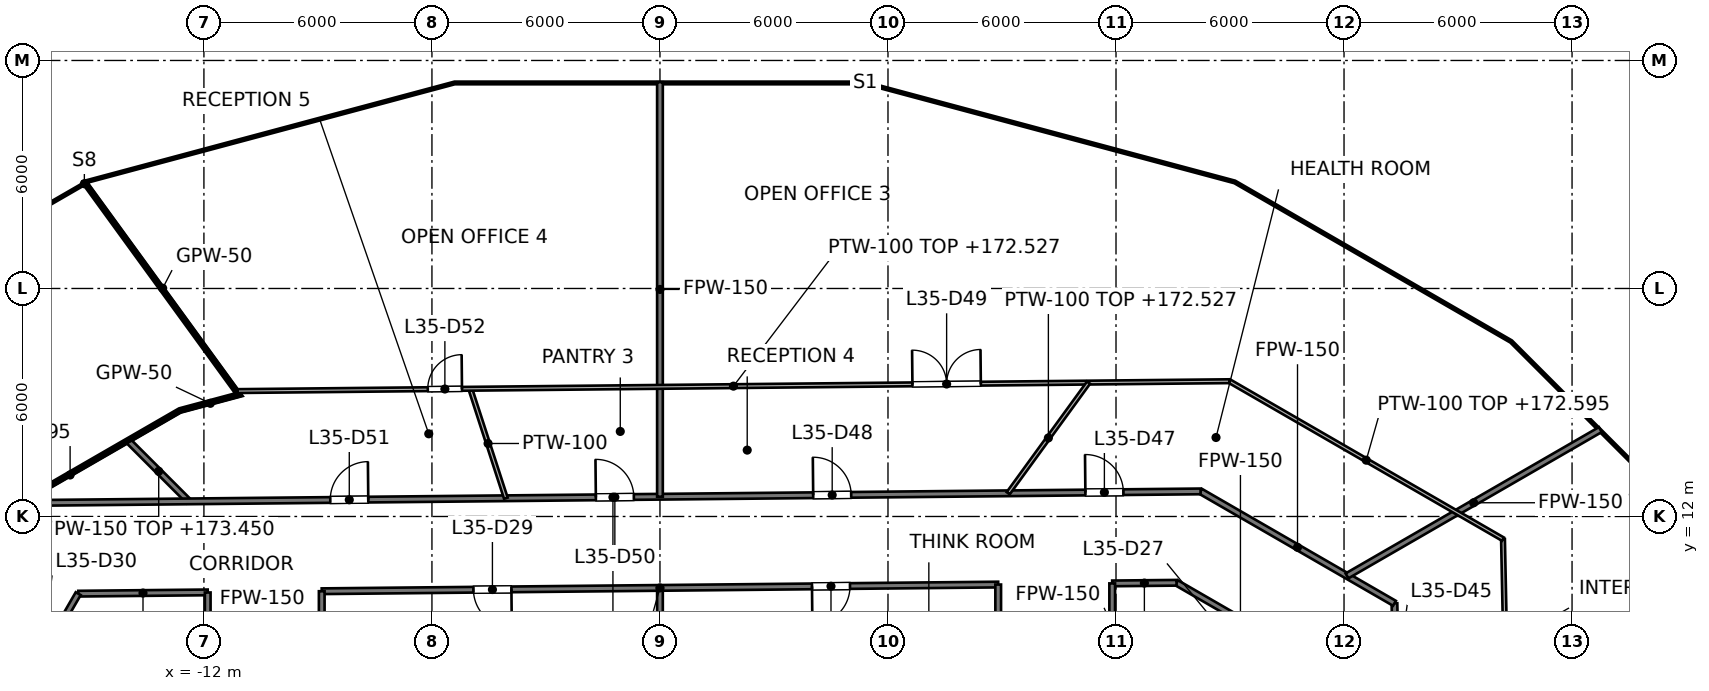
"""IFC4 building model, lengths in metres.
Left out: names, types, materials, properties, quantities, classifications, styles, units other than length and angle.
Written with IfcOpenShell. Run it as: python <this file> out.ifc"""

import sys

from ifc_helpers import new_model, si_unit, direction, frame, frame_2d, origin, place, context, subcontext, project, spatial, rectangle, extrude, element, fill, save


model = new_model("IFC4")
c1 = context("Model", 3, precision=1e-05, world=origin(), true_north=direction((0.0, 1.0)))
c2 = subcontext(c1, "Body", "Model", "MODEL_VIEW")
j1 = project(units=[si_unit("LENGTHUNIT", "METRE"), si_unit("PLANEANGLEUNIT", "RADIAN")], contexts=[c1])
p1 = place(None, origin())
s1 = spatial("IfcSite", under=j1, at=p1, CompositionType="ELEMENT")
p2 = place(p1, origin())
s2 = spatial("IfcBuilding", under=s1, at=p2, CompositionType="ELEMENT")
p3 = place(p2, frame((0.0, 0.0, 169.6)))
s3 = spatial("IfcBuildingStorey", under=s2, at=p3, CompositionType="ELEMENT", Elevation=169.6)
p4 = place(p3, frame((19.327, 9.716, 0.0), z_axis=(0.0, 0.0, 1.0), x_axis=(0.020632909715, -0.999787118859, 0.0)))
e1 = element("IfcWall", 1, at=p4, inside=s3, PredefinedType="PARTITIONING", context=c2, shape_type="SweptSolid", body=[
    extrude(rectangle(XDim=16.921, YDim=0.15, at=frame_2d((8.46, 0.0))), origin(), (0.0, 0.0, 1.0), 2.927),
])
p5 = place(p4, frame((15.451, 0.0, 0.0)))
e2 = element("IfcOpeningElement", 2, at=p5, cuts=e1, PredefinedType="OPENING", context=c2, shape_type="SweptSolid", body=[
    extrude(rectangle(XDim=1.0, YDim=2.1, at=frame_2d((0.5, 1.05))), frame((0.0, 0.075, 0.0), z_axis=(0.0, -1.0, 0.0), x_axis=(1.0, 0.0, 0.0)), (0.0, 0.0, 1.0), 0.15),
])
p6 = place(p4, frame((12.819, 0.0, 0.0)))
e3 = element("IfcOpeningElement", 3, at=p6, cuts=e1, PredefinedType="OPENING", context=c2, shape_type="SweptSolid", body=[
    extrude(rectangle(XDim=1.0, YDim=2.1, at=frame_2d((0.5, 1.05))), frame((0.0, 0.075, 0.0), z_axis=(0.0, -1.0, 0.0), x_axis=(1.0, 0.0, 0.0)), (0.0, 0.0, 1.0), 0.15),
])
p7 = place(p4, frame((9.226, 0.0, 0.0)))
e4 = element("IfcOpeningElement", 4, at=p7, cuts=e1, PredefinedType="OPENING", context=c2, shape_type="SweptSolid", body=[
    extrude(rectangle(XDim=1.0, YDim=2.1, at=frame_2d((0.5, 1.05))), frame((0.0, 0.075, 0.0), z_axis=(0.0, -1.0, 0.0), x_axis=(1.0, 0.0, 0.0)), (0.0, 0.0, 1.0), 0.15),
])
p8 = place(p4, frame((5.762, 0.0, 0.0)))
e5 = element("IfcOpeningElement", 5, at=p8, cuts=e1, PredefinedType="OPENING", context=c2, shape_type="SweptSolid", body=[
    extrude(rectangle(XDim=1.0, YDim=2.1, at=frame_2d((0.5, 1.05))), frame((0.0, 0.075, 0.0), z_axis=(0.0, -1.0, 0.0), x_axis=(1.0, 0.0, 0.0)), (0.0, 0.0, 1.0), 0.15),
])
p9 = place(p4, frame((1.706, 0.0, 0.0)))
e6 = element("IfcOpeningElement", 6, at=p9, cuts=e1, PredefinedType="OPENING", context=c2, shape_type="SweptSolid", body=[
    extrude(rectangle(XDim=1.0, YDim=2.1, at=frame_2d((0.5, 1.05))), frame((0.0, 0.075, 0.0), z_axis=(0.0, -1.0, 0.0), x_axis=(1.0, 0.0, 0.0)), (0.0, 0.0, 1.0), 0.15),
])
p10 = place(p3, frame((-13.981, 13.981, 0.0), z_axis=(0.0, 0.0, 1.0), x_axis=(0.707106781187, -0.707106781187, 0.0)))
e7 = element("IfcWall", 7, at=p10, inside=s3, PredefinedType="PARTITIONING", context=c2, shape_type="SweptSolid", body=[
    extrude(rectangle(XDim=2.239, YDim=0.15, at=frame_2d((1.119, 0.0))), origin(), (0.0, 0.0, 1.0), 3.85),
])
p11 = place(p3, frame((13.593, 10.256, 0.0), z_axis=(0.0, 0.0, 1.0), x_axis=(0.86597823907, -0.500081682786, 0.0)))
e8 = element("IfcWall", 8, at=p11, inside=s3, PredefinedType="PARTITIONING", context=c2, shape_type="SweptSolid", body=[
    extrude(rectangle(XDim=3.883, YDim=0.15, at=frame_2d((1.941, 0.0))), origin(), (0.0, 0.0, 1.0), 2.995),
])
p12 = place(p3, frame((14.225, 12.662, 0.0), z_axis=(0.0, 0.0, 1.0), x_axis=(0.865969566972, -0.500096699728, 0.0)))
e9 = element("IfcWall", 9, at=p12, inside=s3, PredefinedType="PARTITIONING", context=c2, shape_type="SweptSolid", body=[
    extrude(rectangle(XDim=5.891, YDim=0.15, at=frame_2d((2.946, 0.0))), origin(), (0.0, 0.0, 1.0), 2.995),
])
p13 = place(p3, frame((-15.306, 9.969, 0.0), z_axis=(0.0, 0.0, 1.0), x_axis=(0.999951080092, 0.009891280127, 0.0)))
e10 = element("IfcWall", 10, at=p13, inside=s3, PredefinedType="PARTITIONING", context=c2, shape_type="SweptSolid", body=[
    extrude(rectangle(XDim=3.406, YDim=0.15, at=frame_2d((1.703, 0.0))), origin(), (0.0, 0.0, 1.0), 2.995),
])
p14 = place(p3, frame((-8.9, 10.033, 0.0), z_axis=(0.0, 0.0, 1.0), x_axis=(0.999951376553, 0.009861264055, 0.0)))
e11 = element("IfcWall", 11, at=p14, inside=s3, PredefinedType="PARTITIONING", context=c2, shape_type="SweptSolid", body=[
    extrude(rectangle(XDim=17.801, YDim=0.15, at=frame_2d((8.9, 0.0))), origin(), (0.0, 0.0, 1.0), 2.927),
])
p15 = place(p14, frame((12.901, 0.0, 0.0)))
e12 = element("IfcOpeningElement", 12, at=p15, cuts=e11, PredefinedType="OPENING", context=c2, shape_type="SweptSolid", body=[
    extrude(rectangle(XDim=1.0, YDim=2.1, at=frame_2d((0.5, 1.05))), frame((0.0, 0.075, 0.0), z_axis=(0.0, -1.0, 0.0), x_axis=(1.0, 0.0, 0.0)), (0.0, 0.0, 1.0), 0.15),
])
p16 = place(p14, frame((3.992, 0.0, 0.0)))
e13 = element("IfcOpeningElement", 13, at=p16, cuts=e11, PredefinedType="OPENING", context=c2, shape_type="SweptSolid", body=[
    extrude(rectangle(XDim=1.0, YDim=2.1, at=frame_2d((0.5, 1.05))), frame((0.0, 0.075, 0.0), z_axis=(0.0, -1.0, 0.0), x_axis=(1.0, 0.0, 0.0)), (0.0, 0.0, 1.0), 0.15),
])
p17 = place(p3, frame((11.9, 10.239, 0.0), z_axis=(0.0, 0.0, 1.0), x_axis=(0.999951931166, 0.009804863925, 0.0)))
e14 = element("IfcWall", 14, at=p17, inside=s3, PredefinedType="PARTITIONING", context=c2, shape_type="SweptSolid", body=[
    extrude(rectangle(XDim=1.693, YDim=0.15, at=frame_2d((0.847, 0.0))), origin(), (0.0, 0.0, 1.0), 3.85),
])
p18 = place(p3, frame((-16.7, 12.355, 0.0), z_axis=(0.0, 0.0, 1.0), x_axis=(0.999951312483, 0.009867758809, 0.0)))
e15 = element("IfcWall", 15, at=p18, inside=s3, PredefinedType="PARTITIONING", context=c2, shape_type="SweptSolid", body=[
    extrude(rectangle(XDim=30.927, YDim=0.15, at=frame_2d((15.463, 0.0))), origin(), (0.0, 0.0, 1.0), 2.927),
])
p19 = place(p18, frame((27.896, 0.0, 0.0)))
e16 = element("IfcOpeningElement", 16, at=p19, cuts=e15, PredefinedType="OPENING", context=c2, shape_type="SweptSolid", body=[
    extrude(rectangle(XDim=1.0, YDim=2.1, at=frame_2d((0.5, 1.05))), frame((0.0, 0.075, 0.0), z_axis=(0.0, -1.0, 0.0), x_axis=(1.0, 0.0, 0.0)), (0.0, 0.0, 1.0), 0.15),
])
p20 = place(p18, frame((20.733, 0.0, 0.0)))
e17 = element("IfcOpeningElement", 17, at=p20, cuts=e15, PredefinedType="OPENING", context=c2, shape_type="SweptSolid", body=[
    extrude(rectangle(XDim=1.0, YDim=2.1, at=frame_2d((0.5, 1.05))), frame((0.0, 0.075, 0.0), z_axis=(0.0, -1.0, 0.0), x_axis=(1.0, 0.0, 0.0)), (0.0, 0.0, 1.0), 0.15),
])
p21 = place(p18, frame((15.014, 0.0, 0.0)))
e18 = element("IfcOpeningElement", 18, at=p21, cuts=e15, PredefinedType="OPENING", context=c2, shape_type="SweptSolid", body=[
    extrude(rectangle(XDim=1.0, YDim=2.1, at=frame_2d((0.5, 1.05))), frame((0.0, 0.075, 0.0), z_axis=(0.0, -1.0, 0.0), x_axis=(1.0, 0.0, 0.0)), (0.0, 0.0, 1.0), 0.15),
])
p22 = place(p18, frame((8.025, 0.0, 0.0)))
e19 = element("IfcOpeningElement", 19, at=p22, cuts=e15, PredefinedType="OPENING", context=c2, shape_type="SweptSolid", body=[
    extrude(rectangle(XDim=1.0, YDim=2.1, at=frame_2d((0.5, 1.05))), frame((0.0, 0.075, 0.0), z_axis=(0.0, -1.0, 0.0), x_axis=(1.0, 0.0, 0.0)), (0.0, 0.0, 1.0), 0.15),
])
p23 = place(p3, frame((18.078, 10.437, 0.0), z_axis=(0.0, 0.0, 1.0), x_axis=(0.865997546841, 0.500048246539, 0.0)))
e20 = element("IfcWall", 20, at=p23, inside=s3, PredefinedType="PARTITIONING", context=c2, shape_type="SweptSolid", body=[
    extrude(rectangle(XDim=7.698, YDim=0.15, at=frame_2d((3.849, 0.0))), origin(), (0.0, 0.0, 1.0), 3.152),
])
p24 = place(p3, frame((-17.25, 6.603, 0.0), z_axis=(0.0, 0.0, 1.0), x_axis=(0.499659014053, 0.866222182627, 0.0)))
e21 = element("IfcWall", 21, at=p24, inside=s3, PredefinedType="PARTITIONING", context=c2, shape_type="SweptSolid", body=[
    extrude(rectangle(XDim=3.887, YDim=0.15, at=frame_2d((1.943, 0.0))), origin(), (0.0, 0.0, 1.0), 2.995),
])
p25 = place(p24, frame((1.434, 0.0, 0.0)))
e22 = element("IfcOpeningElement", 22, at=p25, cuts=e21, PredefinedType="OPENING", context=c2, shape_type="SweptSolid", body=[
    extrude(rectangle(XDim=1.0, YDim=2.1, at=frame_2d((0.5, 1.05))), frame((0.0, 0.075, 0.0), z_axis=(0.0, -1.0, 0.0), x_axis=(1.0, 0.0, 0.0)), (0.0, 0.0, 1.0), 0.15),
])
p26 = place(p3, frame((11.9, 8.0, 0.0), z_axis=(0.0, 0.0, 1.0), x_axis=(0.0, 1.0, 0.0)))
e23 = element("IfcWall", 23, at=p26, inside=s3, PredefinedType="PARTITIONING", context=c2, shape_type="SweptSolid", body=[
    extrude(rectangle(XDim=2.239, YDim=0.15, at=frame_2d((1.12, 0.0))), origin(), (0.0, 0.0, 1.0), 2.995),
])
p27 = place(p3, frame((8.9, 8.0, 0.0), z_axis=(0.0, 0.0, 1.0), x_axis=(0.0, 1.0, 0.0)))
e24 = element("IfcWall", 24, at=p27, inside=s3, PredefinedType="PARTITIONING", context=c2, shape_type="SweptSolid", body=[
    extrude(rectangle(XDim=2.209, YDim=0.15, at=frame_2d((1.104, 0.0))), origin(), (0.0, 0.0, 1.0), 3.076),
])
p28 = place(p3, frame((0.0, 8.0, 0.0), z_axis=(0.0, 0.0, 1.0), x_axis=(0.0, 1.0, 0.0)))
e25 = element("IfcWall", 25, at=p28, inside=s3, PredefinedType="PARTITIONING", context=c2, shape_type="SweptSolid", body=[
    extrude(rectangle(XDim=2.121, YDim=0.15, at=frame_2d((1.061, 0.0))), origin(), (0.0, 0.0, 1.0), 2.995),
])
p29 = place(p3, frame((0.0, 12.521, 0.0), z_axis=(0.0, 0.0, 1.0), x_axis=(0.0, 1.0, 0.0)))
e26 = element("IfcWall", 26, at=p29, inside=s3, PredefinedType="PARTITIONING", context=c2, shape_type="SweptSolid", body=[
    extrude(rectangle(XDim=10.908, YDim=0.15, at=frame_2d((5.454, 0.0))), origin(), (0.0, 0.0, 1.0), 2.995),
])
p30 = place(p3, frame((-8.9, 8.0, 0.0), z_axis=(0.0, 0.0, 1.0), x_axis=(0.0, 1.0, 0.0)))
e27 = element("IfcWall", 27, at=p30, inside=s3, PredefinedType="PARTITIONING", context=c2, shape_type="SweptSolid", body=[
    extrude(rectangle(XDim=2.033, YDim=0.15, at=frame_2d((1.017, 0.0))), origin(), (0.0, 0.0, 1.0), 3.85),
])
p31 = place(p3, frame((-11.9, 8.0, 0.0), z_axis=(0.0, 0.0, 1.0), x_axis=(0.0, 1.0, 0.0)))
e28 = element("IfcWall", 28, at=p31, inside=s3, PredefinedType="PARTITIONING", context=c2, shape_type="SweptSolid", body=[
    extrude(rectangle(XDim=2.0, YDim=0.15, at=frame_2d((1.0, 0.0))), origin(), (0.0, 0.0, 1.0), 2.995),
])
p32 = place(p3, frame((-15.132, 20.822, 0.0), z_axis=(0.0, 0.0, 1.0), x_axis=(0.588027821511, -0.808840701949, 0.0)))
e29 = element("IfcWall", 29, at=p32, inside=s3, PredefinedType="PARTITIONING", context=c2, shape_type="SweptSolid", body=[
    extrude(rectangle(XDim=6.962, YDim=0.05, at=frame_2d((3.481, 0.0))), origin(), (0.0, 0.0, 1.0), 2.927),
])
p33 = place(p3, frame((-12.623, 14.765, 0.0), z_axis=(0.0, 0.0, 1.0), x_axis=(0.965831022922, 0.259172597242, 0.0)))
e30 = element("IfcWall", 30, at=p33, inside=s3, PredefinedType="PARTITIONING", context=c2, shape_type="SweptSolid", body=[
    extrude(rectangle(XDim=1.64, YDim=0.05, at=frame_2d((0.82, 0.0))), origin(), (0.0, 0.0, 1.0), 2.927),
])
p34 = place(p3, frame((-18.419, 11.419, 0.0), z_axis=(0.0, 0.0, 1.0), x_axis=(0.866045865693, 0.499964557259, 0.0)))
e31 = element("IfcWall", 31, at=p34, inside=s3, PredefinedType="PARTITIONING", context=c2, shape_type="SweptSolid", body=[
    extrude(rectangle(XDim=6.692, YDim=0.05, at=frame_2d((3.346, 0.0))), origin(), (0.0, 0.0, 1.0), 2.995),
])
p35 = place(p3, frame((22.183, 11.404, 0.0), z_axis=(0.0, 0.0, 1.0), x_axis=(0.020584540725, -0.999788115894, 0.0)))
e32 = element("IfcWall", 32, at=p35, inside=s3, PredefinedType="PARTITIONING", context=c2, shape_type="SweptSolid", body=[
    extrude(rectangle(XDim=19.356, YDim=0.1, at=frame_2d((9.678, 0.0))), origin(), (0.0, 0.0, 1.0), 2.927),
])
p36 = place(p35, frame((2.704, 0.0, 0.0)))
e33 = element("IfcOpeningElement", 33, at=p36, cuts=e32, PredefinedType="OPENING", context=c2, shape_type="SweptSolid", body=[
    extrude(rectangle(XDim=1.8, YDim=2.1, at=frame_2d((0.9, 1.05))), frame((0.0, 0.05, 0.0), z_axis=(0.0, -1.0, 0.0), x_axis=(1.0, 0.0, 0.0)), (0.0, 0.0, 1.0), 0.1),
])
p37 = place(p3, frame((-4.991, 15.361, 0.0), z_axis=(0.0, 0.0, 1.0), x_axis=(0.309084249462, -0.951034661164, 0.0)))
e34 = element("IfcWall", 34, at=p37, inside=s3, PredefinedType="PARTITIONING", context=c2, shape_type="SweptSolid", body=[
    extrude(rectangle(XDim=3.028, YDim=0.1, at=frame_2d((1.514, 0.0))), origin(), (0.0, 0.0, 1.0), 3.85),
])
p38 = place(p3, frame((14.986, 15.56, 0.0), z_axis=(0.0, 0.0, 1.0), x_axis=(0.865930670747, -0.500164046549, 0.0)))
e35 = element("IfcWall", 35, at=p38, inside=s3, PredefinedType="PARTITIONING", context=c2, shape_type="SweptSolid", body=[
    extrude(rectangle(XDim=8.311, YDim=0.1, at=frame_2d((4.155, 0.0))), origin(), (0.0, 0.0, 1.0), 2.995),
])
p39 = place(p3, frame((-11.119, 15.3, 0.0), z_axis=(0.0, 0.0, 1.0), x_axis=(0.999950401303, 0.009959665352, 0.0)))
e36 = element("IfcWall", 36, at=p39, inside=s3, PredefinedType="PARTITIONING", context=c2, shape_type="SweptSolid", body=[
    extrude(rectangle(XDim=26.106, YDim=0.1, at=frame_2d((13.053, 0.0))), origin(), (0.0, 0.0, 1.0), 2.927),
])
p40 = place(p39, frame((17.763, 0.0, 0.0)))
e37 = element("IfcOpeningElement", 37, at=p40, cuts=e36, PredefinedType="OPENING", context=c2, shape_type="SweptSolid", body=[
    extrude(rectangle(XDim=1.8, YDim=2.1, at=frame_2d((0.9, 1.05))), frame((0.0, 0.05, 0.0), z_axis=(0.0, -1.0, 0.0), x_axis=(1.0, 0.0, 0.0)), (0.0, 0.0, 1.0), 0.1),
])
p41 = place(p39, frame((5.01, 0.0, 0.0)))
e38 = element("IfcOpeningElement", 38, at=p41, cuts=e36, PredefinedType="OPENING", context=c2, shape_type="SweptSolid", body=[
    extrude(rectangle(XDim=0.9, YDim=2.1, at=frame_2d((0.45, 1.05))), frame((0.0, 0.05, 0.0), z_axis=(0.0, -1.0, 0.0), x_axis=(1.0, 0.0, 0.0)), (0.0, 0.0, 1.0), 0.1),
])
p42 = place(p3, frame((9.163, 12.612, 0.0), z_axis=(0.0, 0.0, 1.0), x_axis=(0.587804501094, 0.809003008952, 0.0)))
e39 = element("IfcWall", 39, at=p42, inside=s3, PredefinedType="PARTITIONING", context=c2, shape_type="SweptSolid", body=[
    extrude(rectangle(XDim=3.598, YDim=0.1, at=frame_2d((1.799, 0.0))), origin(), (0.0, 0.0, 1.0), 2.927),
])
p43 = place(p15, origin())
e40 = element("IfcDoor", 40, at=p43, inside=s3, OperationType="SINGLE_SWING_LEFT", PredefinedType="DOOR", context=c2, shape_type="SweptSolid", body=[
    extrude(rectangle(XDim=1.0, YDim=2.1, at=frame_2d((0.5, 1.05))), frame((0.0, 0.025, 0.0), z_axis=(0.0, -1.0, 0.0), x_axis=(1.0, 0.0, 0.0)), (0.0, 0.0, 1.0), 0.05),
])
fill(e12, e40)
p44 = place(p16, origin())
e41 = element("IfcDoor", 41, at=p44, inside=s3, OperationType="SINGLE_SWING_RIGHT", PredefinedType="DOOR", context=c2, shape_type="SweptSolid", body=[
    extrude(rectangle(XDim=1.0, YDim=2.1, at=frame_2d((0.5, 1.05))), frame((0.0, 0.025, 0.0), z_axis=(0.0, -1.0, 0.0), x_axis=(1.0, 0.0, 0.0)), (0.0, 0.0, 1.0), 0.05),
])
fill(e13, e41)
p45 = place(p19, origin())
e42 = element("IfcDoor", 42, at=p45, inside=s3, OperationType="SINGLE_SWING_LEFT", PredefinedType="DOOR", context=c2, shape_type="SweptSolid", body=[
    extrude(rectangle(XDim=1.0, YDim=2.1, at=frame_2d((0.5, 1.05))), frame((0.0, 0.025, 0.0), z_axis=(0.0, -1.0, 0.0), x_axis=(1.0, 0.0, 0.0)), (0.0, 0.0, 1.0), 0.05),
])
fill(e16, e42)
p46 = place(p20, origin())
e43 = element("IfcDoor", 43, at=p46, inside=s3, OperationType="SINGLE_SWING_LEFT", PredefinedType="DOOR", context=c2, shape_type="SweptSolid", body=[
    extrude(rectangle(XDim=1.0, YDim=2.1, at=frame_2d((0.5, 1.05))), frame((0.0, 0.025, 0.0), z_axis=(0.0, -1.0, 0.0), x_axis=(1.0, 0.0, 0.0)), (0.0, 0.0, 1.0), 0.05),
])
fill(e17, e43)
p47 = place(p40, origin())
e44 = element("IfcDoor", 44, at=p47, inside=s3, OperationType="DOUBLE_DOOR_SINGLE_SWING", PredefinedType="DOOR", context=c2, shape_type="SweptSolid", body=[
    extrude(rectangle(XDim=1.8, YDim=2.1, at=frame_2d((0.9, 1.05))), frame((0.0, 0.025, 0.0), z_axis=(0.0, -1.0, 0.0), x_axis=(1.0, 0.0, 0.0)), (0.0, 0.0, 1.0), 0.05),
])
fill(e37, e44)
p48 = place(p21, origin())
e45 = element("IfcDoor", 45, at=p48, inside=s3, OperationType="SINGLE_SWING_LEFT", PredefinedType="DOOR", context=c2, shape_type="SweptSolid", body=[
    extrude(rectangle(XDim=1.0, YDim=2.1, at=frame_2d((0.5, 1.05))), frame((0.0, 0.025, 0.0), z_axis=(0.0, -1.0, 0.0), x_axis=(1.0, 0.0, 0.0)), (0.0, 0.0, 1.0), 0.05),
])
fill(e18, e45)
p49 = place(p22, origin())
e46 = element("IfcDoor", 46, at=p49, inside=s3, OperationType="SINGLE_SWING_RIGHT", PredefinedType="DOOR", context=c2, shape_type="SweptSolid", body=[
    extrude(rectangle(XDim=1.0, YDim=2.1, at=frame_2d((0.5, 1.05))), frame((0.0, 0.025, 0.0), z_axis=(0.0, -1.0, 0.0), x_axis=(1.0, 0.0, 0.0)), (0.0, 0.0, 1.0), 0.05),
])
fill(e19, e46)
p50 = place(p41, origin())
e47 = element("IfcDoor", 47, at=p50, inside=s3, OperationType="SINGLE_SWING_RIGHT", PredefinedType="DOOR", context=c2, shape_type="SweptSolid", body=[
    extrude(rectangle(XDim=0.9, YDim=2.1, at=frame_2d((0.45, 1.05))), frame((0.0, 0.025, 0.0), z_axis=(0.0, -1.0, 0.0), x_axis=(1.0, 0.0, 0.0)), (0.0, 0.0, 1.0), 0.05),
])
fill(e38, e47)
save(model, sys.argv[1])
